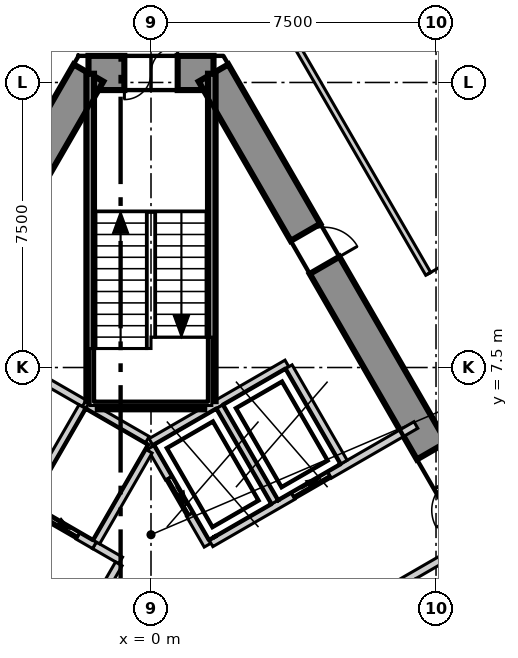
"""IFC4 building model, lengths in metres.
Left out: names, types, materials, properties, quantities, classifications, styles, units other than length and angle.
Written with IfcOpenShell. Run it as: python <this file> out.ifc"""

import sys

from ifc_helpers import new_model, si_unit, direction, frame, frame_2d, origin, place, context, subcontext, project, spatial, polyline, rectangle, outline, extrude, element, fill, save


model = new_model("IFC4")
c1 = context("Model", 3, precision=1e-05, world=origin(), true_north=direction((0.0, 1.0)))
c2 = subcontext(c1, "Body", "Model", "MODEL_VIEW")
j1 = project(units=[si_unit("LENGTHUNIT", "METRE"), si_unit("PLANEANGLEUNIT", "RADIAN")], contexts=[c1])
p1 = place(None, origin())
s1 = spatial("IfcSite", under=j1, at=p1, CompositionType="ELEMENT")
p2 = place(p1, origin())
s2 = spatial("IfcBuilding", under=s1, at=p2, CompositionType="ELEMENT")
p3 = place(p2, frame((0.0, 0.0, 83.3)))
s3 = spatial("IfcBuildingStorey", under=s2, at=p3, CompositionType="ELEMENT", Elevation=83.3)
p4 = place(p3, frame((1.645, 15.25, -0.3), z_axis=(0.0, 0.0, 1.0), x_axis=(-1.0, 0.0, 0.0)))
e1 = element("IfcWall", 1, at=p4, inside=s3, PredefinedType="SHEAR", context=c2, shape_type="SweptSolid", body=[
    extrude(outline(polyline([(-0.26, -0.45), (1.645, -0.45), (3.55, -0.45), (3.031, 0.45), (1.645, 0.45), (0.259, 0.45), (-0.26, -0.45)])), origin(), (0.0, 0.0, 1.0), 4.0),
])
p5 = place(p4, frame((0.945, 0.0, 0.3)))
e2 = element("IfcOpeningElement", 2, at=p5, cuts=e1, PredefinedType="OPENING", context=c2, shape_type="SweptSolid", body=[
    extrude(rectangle(XDim=1.4, YDim=2.1, at=frame_2d((0.7, 1.05))), frame((0.0, 0.46, 0.0), z_axis=(0.0, -1.0, 0.0), x_axis=(1.0, 0.0, 0.0)), (0.0, 0.0, 1.0), 0.92),
])
p6 = place(p3, frame((-1.645, 15.25, -0.3), z_axis=(0.0, 0.0, 1.0), x_axis=(-0.500026485275, -0.866010111964, 0.0)))
e3 = element("IfcWall", 3, at=p6, inside=s3, PredefinedType="SHEAR", context=c2, shape_type="SweptSolid", body=[
    extrude(outline(polyline([(-0.26, -0.45), (1.685, -0.45), (3.63, -0.45), (5.576, -0.45), (7.521, -0.45), (9.466, -0.449), (11.411, -0.449), (13.357, -0.449), (15.302, -0.449), (17.247, -0.449), (19.192, -0.449), (21.138, -0.449), (23.083, -0.449), (25.028, -0.449), (24.509, 0.45), (22.644, 0.45), (20.778, 0.45), (18.913, 0.45), (17.048, 0.45), (15.182, 0.449), (13.317, 0.449), (11.452, 0.449), (9.587, 0.449), (7.721, 0.449), (5.856, 0.449), (3.991, 0.449), (2.125, 0.449), (0.26, 0.449), (-0.26, -0.45)])), origin(), (0.0, 0.0, 1.0), 4.0),
])
p7 = place(p6, frame((11.834, 0.0, 0.3)))
e4 = element("IfcOpeningElement", 4, at=p7, cuts=e3, PredefinedType="OPENING", context=c2, shape_type="SweptSolid", body=[
    extrude(rectangle(XDim=1.1, YDim=2.1, at=frame_2d((0.55, 1.05))), frame((0.0, 0.46, 0.0), z_axis=(0.0, -1.0, 0.0), x_axis=(1.0, 0.0, 0.0)), (0.0, 0.0, 1.0), 0.92),
])
p8 = place(p6, frame((18.976, 0.0, 0.3)))
e5 = element("IfcOpeningElement", 5, at=p8, cuts=e3, PredefinedType="OPENING", context=c2, shape_type="SweptSolid", body=[
    extrude(rectangle(XDim=0.9, YDim=2.1, at=frame_2d((0.45, 1.05))), frame((0.0, 0.46, 0.0), z_axis=(0.0, -1.0, 0.0), x_axis=(1.0, 0.0, 0.0)), (0.0, 0.0, 1.0), 0.92),
])
p9 = place(p3, frame((14.03, -6.2, -0.3), z_axis=(0.0, 0.0, 1.0), x_axis=(-0.500026485275, 0.866010111964, 0.0)))
e6 = element("IfcWall", 6, at=p9, inside=s3, PredefinedType="SHEAR", context=c2, shape_type="SweptSolid", body=[
    extrude(outline(polyline([(-0.26, -0.449), (1.685, -0.449), (3.63, -0.449), (5.576, -0.449), (7.521, -0.449), (9.466, -0.449), (11.411, -0.449), (13.357, -0.449), (15.302, -0.449), (17.247, -0.45), (19.192, -0.45), (21.138, -0.45), (23.083, -0.45), (25.028, -0.45), (24.509, 0.449), (22.644, 0.449), (20.778, 0.449), (18.913, 0.449), (17.048, 0.449), (15.182, 0.449), (13.317, 0.449), (11.452, 0.449), (9.587, 0.449), (7.721, 0.45), (5.856, 0.45), (3.991, 0.45), (2.125, 0.45), (0.26, 0.45), (-0.26, -0.449)])), origin(), (0.0, 0.0, 1.0), 4.0),
])
p10 = place(p9, frame((11.484, 0.0, 0.3)))
e7 = element("IfcOpeningElement", 7, at=p10, cuts=e6, PredefinedType="OPENING", context=c2, shape_type="SweptSolid", body=[
    extrude(rectangle(XDim=1.8, YDim=2.1, at=frame_2d((0.9, 1.05))), frame((0.0, 0.46, 0.0), z_axis=(0.0, -1.0, 0.0), x_axis=(1.0, 0.0, 0.0)), (0.0, 0.0, 1.0), 0.92),
])
p11 = place(p9, frame((18.926, 0.0, 0.3)))
e8 = element("IfcOpeningElement", 8, at=p11, cuts=e6, PredefinedType="OPENING", context=c2, shape_type="SweptSolid", body=[
    extrude(rectangle(XDim=1.0, YDim=2.1, at=frame_2d((0.5, 1.05))), frame((0.0, 0.46, 0.0), z_axis=(0.0, -1.0, 0.0), x_axis=(1.0, 0.0, 0.0)), (0.0, 0.0, 1.0), 0.92),
])
p12 = place(p3, frame((33.317, -15.448, 0.0), z_axis=(0.0, 0.0, 1.0), x_axis=(-0.499999874703, 0.866025476125, 0.0)))
e9 = element("IfcWall", 9, at=p12, inside=s3, PredefinedType="ELEMENTEDWALL", context=c2, shape_type="SweptSolid", body=[
    extrude(rectangle(XDim=60.054, YDim=0.2, at=frame_2d((30.027, 0.0))), origin(), (0.0, 0.0, 1.0), 3.7),
])
p13 = place(p12, frame((2.094, 0.0, 0.9)))
e10 = element("IfcOpeningElement", 10, at=p13, cuts=e9, PredefinedType="OPENING", context=c2, shape_type="SweptSolid", body=[
    extrude(rectangle(XDim=5.6, YDim=2.5, at=frame_2d((2.8, 1.25))), frame((0.0, 0.11, 0.0), z_axis=(0.0, -1.0, 0.0), x_axis=(1.0, 0.0, 0.0)), (0.0, 0.0, 1.0), 0.22),
])
p14 = place(p12, frame((9.278, 0.0, 0.9)))
e11 = element("IfcOpeningElement", 11, at=p14, cuts=e9, PredefinedType="OPENING", context=c2, shape_type="SweptSolid", body=[
    extrude(rectangle(XDim=5.6, YDim=2.5, at=frame_2d((2.8, 1.25))), frame((0.0, 0.11, 0.0), z_axis=(0.0, -1.0, 0.0), x_axis=(1.0, 0.0, 0.0)), (0.0, 0.0, 1.0), 0.22),
])
p15 = place(p12, frame((16.462, 0.0, 0.9)))
e12 = element("IfcOpeningElement", 12, at=p15, cuts=e9, PredefinedType="OPENING", context=c2, shape_type="SweptSolid", body=[
    extrude(rectangle(XDim=5.6, YDim=2.5, at=frame_2d((2.8, 1.25))), frame((0.0, 0.11, 0.0), z_axis=(0.0, -1.0, 0.0), x_axis=(1.0, 0.0, 0.0)), (0.0, 0.0, 1.0), 0.22),
])
p16 = place(p12, frame((23.645, 0.0, 0.9)))
e13 = element("IfcOpeningElement", 13, at=p16, cuts=e9, PredefinedType="OPENING", context=c2, shape_type="SweptSolid", body=[
    extrude(rectangle(XDim=5.6, YDim=2.5, at=frame_2d((2.8, 1.25))), frame((0.0, 0.11, 0.0), z_axis=(0.0, -1.0, 0.0), x_axis=(1.0, 0.0, 0.0)), (0.0, 0.0, 1.0), 0.22),
])
p17 = place(p12, frame((30.829, 0.0, 0.9)))
e14 = element("IfcOpeningElement", 14, at=p17, cuts=e9, PredefinedType="OPENING", context=c2, shape_type="SweptSolid", body=[
    extrude(rectangle(XDim=5.6, YDim=2.5, at=frame_2d((2.8, 1.25))), frame((0.0, 0.11, 0.0), z_axis=(0.0, -1.0, 0.0), x_axis=(1.0, 0.0, 0.0)), (0.0, 0.0, 1.0), 0.22),
])
p18 = place(p12, frame((38.012, 0.0, 0.9)))
e15 = element("IfcOpeningElement", 15, at=p18, cuts=e9, PredefinedType="OPENING", context=c2, shape_type="SweptSolid", body=[
    extrude(rectangle(XDim=5.6, YDim=2.5, at=frame_2d((2.8, 1.25))), frame((0.0, 0.11, 0.0), z_axis=(0.0, -1.0, 0.0), x_axis=(1.0, 0.0, 0.0)), (0.0, 0.0, 1.0), 0.22),
])
p19 = place(p12, frame((45.196, 0.0, 0.9)))
e16 = element("IfcOpeningElement", 16, at=p19, cuts=e9, PredefinedType="OPENING", context=c2, shape_type="SweptSolid", body=[
    extrude(rectangle(XDim=5.6, YDim=2.5, at=frame_2d((2.8, 1.25))), frame((0.0, 0.11, 0.0), z_axis=(0.0, -1.0, 0.0), x_axis=(1.0, 0.0, 0.0)), (0.0, 0.0, 1.0), 0.22),
])
p20 = place(p12, frame((52.379, 0.0, 0.9)))
e17 = element("IfcOpeningElement", 17, at=p20, cuts=e9, PredefinedType="OPENING", context=c2, shape_type="SweptSolid", body=[
    extrude(rectangle(XDim=5.6, YDim=2.5, at=frame_2d((2.8, 1.25))), frame((0.0, 0.11, 0.0), z_axis=(0.0, -1.0, 0.0), x_axis=(1.0, 0.0, 0.0)), (0.0, 0.0, 1.0), 0.22),
])
p21 = place(p3, frame((-19.497, -11.17, 0.0), z_axis=(0.0, 0.0, 1.0), x_axis=(0.499998854553, 0.866026065108, 0.0)))
e18 = element("IfcWall", 18, at=p21, inside=s3, PredefinedType="PARTITIONING", context=c2, shape_type="SweptSolid", body=[
    extrude(rectangle(XDim=38.994, YDim=0.15, at=frame_2d((19.497, 0.0))), origin(), (0.0, 0.0, 1.0), 3.7),
])
p22 = place(p21, frame((35.844, 0.0, 0.0)))
e19 = element("IfcOpeningElement", 19, at=p22, cuts=e18, PredefinedType="OPENING", context=c2, shape_type="SweptSolid", body=[
    extrude(rectangle(XDim=1.1, YDim=2.1, at=frame_2d((0.55, 1.05))), frame((0.0, 0.085, 0.0), z_axis=(0.0, -1.0, 0.0), x_axis=(1.0, 0.0, 0.0)), (0.0, 0.0, 1.0), 0.17),
])
p23 = place(p21, frame((26.04, 0.0, 0.0)))
e20 = element("IfcOpeningElement", 20, at=p23, cuts=e18, PredefinedType="OPENING", context=c2, shape_type="SweptSolid", body=[
    extrude(rectangle(XDim=1.1, YDim=2.1, at=frame_2d((0.55, 1.05))), frame((0.0, 0.085, 0.0), z_axis=(0.0, -1.0, 0.0), x_axis=(1.0, 0.0, 0.0)), (0.0, 0.0, 1.0), 0.17),
])
p24 = place(p21, frame((7.272, 0.0, 0.0)))
e21 = element("IfcOpeningElement", 21, at=p24, cuts=e18, PredefinedType="OPENING", context=c2, shape_type="SweptSolid", body=[
    extrude(rectangle(XDim=1.1, YDim=2.1, at=frame_2d((0.55, 1.05))), frame((0.0, 0.085, 0.0), z_axis=(0.0, -1.0, 0.0), x_axis=(1.0, 0.0, 0.0)), (0.0, 0.0, 1.0), 0.17),
])
p25 = place(p21, frame((17.372, 0.0, 0.0)))
e22 = element("IfcOpeningElement", 22, at=p25, cuts=e18, PredefinedType="OPENING", context=c2, shape_type="SweptSolid", body=[
    extrude(rectangle(XDim=0.9, YDim=2.1, at=frame_2d((0.45, 1.05))), frame((0.0, 0.085, 0.0), z_axis=(0.0, -1.0, 0.0), x_axis=(1.0, 0.0, 0.0)), (0.0, 0.0, 1.0), 0.17),
])
p26 = place(p21, frame((14.172, 0.0, 0.0)))
e23 = element("IfcOpeningElement", 23, at=p26, cuts=e18, PredefinedType="OPENING", context=c2, shape_type="SweptSolid", body=[
    extrude(rectangle(XDim=0.9, YDim=2.1, at=frame_2d((0.45, 1.05))), frame((0.0, 0.085, 0.0), z_axis=(0.0, -1.0, 0.0), x_axis=(1.0, 0.0, 0.0)), (0.0, 0.0, 1.0), 0.17),
])
p27 = place(p21, frame((11.272, 0.0, 0.0)))
e24 = element("IfcOpeningElement", 24, at=p27, cuts=e18, PredefinedType="OPENING", context=c2, shape_type="SweptSolid", body=[
    extrude(rectangle(XDim=1.0, YDim=2.1, at=frame_2d((0.5, 1.05))), frame((0.0, 0.085, 0.0), z_axis=(0.0, -1.0, 0.0), x_axis=(1.0, 0.0, 0.0)), (0.0, 0.0, 1.0), 0.17),
])
p28 = place(p21, frame((1.904, 0.0, 0.0)))
e25 = element("IfcOpeningElement", 25, at=p28, cuts=e18, PredefinedType="OPENING", context=c2, shape_type="SweptSolid", body=[
    extrude(rectangle(XDim=1.1, YDim=2.1, at=frame_2d((0.55, 1.05))), frame((0.0, 0.085, 0.0), z_axis=(0.0, -1.0, 0.0), x_axis=(1.0, 0.0, 0.0)), (0.0, 0.0, 1.0), 0.17),
])
p29 = place(p3, frame((0.075, 22.47, 0.0), z_axis=(0.0, 0.0, 1.0), x_axis=(0.500002280369, -0.866024087209, 0.0)))
e26 = element("IfcWall", 26, at=p29, inside=s3, PredefinedType="PARTITIONING", context=c2, shape_type="SweptSolid", body=[
    extrude(rectangle(XDim=38.844, YDim=0.15, at=frame_2d((19.422, 0.0))), origin(), (0.0, 0.0, 1.0), 3.7),
])
p30 = place(p29, frame((35.844, 0.0, 0.0)))
e27 = element("IfcOpeningElement", 27, at=p30, cuts=e26, PredefinedType="OPENING", context=c2, shape_type="SweptSolid", body=[
    extrude(rectangle(XDim=1.1, YDim=2.1, at=frame_2d((0.55, 1.05))), frame((0.0, 0.085, 0.0), z_axis=(0.0, -1.0, 0.0), x_axis=(1.0, 0.0, 0.0)), (0.0, 0.0, 1.0), 0.17),
])
p31 = place(p29, frame((14.44, 0.0, 0.0)))
e28 = element("IfcOpeningElement", 28, at=p31, cuts=e26, PredefinedType="OPENING", context=c2, shape_type="SweptSolid", body=[
    extrude(rectangle(XDim=1.1, YDim=2.1, at=frame_2d((0.55, 1.05))), frame((0.0, 0.085, 0.0), z_axis=(0.0, -1.0, 0.0), x_axis=(1.0, 0.0, 0.0)), (0.0, 0.0, 1.0), 0.17),
])
p32 = place(p29, frame((31.74, 0.0, 0.0)))
e29 = element("IfcOpeningElement", 29, at=p32, cuts=e26, PredefinedType="OPENING", context=c2, shape_type="SweptSolid", body=[
    extrude(rectangle(XDim=0.9, YDim=2.1, at=frame_2d((0.45, 1.05))), frame((0.0, 0.085, 0.0), z_axis=(0.0, -1.0, 0.0), x_axis=(1.0, 0.0, 0.0)), (0.0, 0.0, 1.0), 0.17),
])
p33 = place(p29, frame((28.54, 0.0, 0.0)))
e30 = element("IfcOpeningElement", 30, at=p33, cuts=e26, PredefinedType="OPENING", context=c2, shape_type="SweptSolid", body=[
    extrude(rectangle(XDim=0.9, YDim=2.1, at=frame_2d((0.45, 1.05))), frame((0.0, 0.085, 0.0), z_axis=(0.0, -1.0, 0.0), x_axis=(1.0, 0.0, 0.0)), (0.0, 0.0, 1.0), 0.17),
])
p34 = place(p29, frame((25.74, 0.0, 0.0)))
e31 = element("IfcOpeningElement", 31, at=p34, cuts=e26, PredefinedType="OPENING", context=c2, shape_type="SweptSolid", body=[
    extrude(rectangle(XDim=1.0, YDim=2.1, at=frame_2d((0.5, 1.05))), frame((0.0, 0.085, 0.0), z_axis=(0.0, -1.0, 0.0), x_axis=(1.0, 0.0, 0.0)), (0.0, 0.0, 1.0), 0.17),
])
p35 = place(p29, frame((1.905, 0.0, 0.0)))
e32 = element("IfcOpeningElement", 32, at=p35, cuts=e26, PredefinedType="OPENING", context=c2, shape_type="SweptSolid", body=[
    extrude(rectangle(XDim=1.1, YDim=2.1, at=frame_2d((0.55, 1.05))), frame((0.0, 0.085, 0.0), z_axis=(0.0, -1.0, 0.0), x_axis=(1.0, 0.0, 0.0)), (0.0, 0.0, 1.0), 0.17),
])
p36 = place(p3, frame((-0.002, 5.541, 0.0), z_axis=(0.0, 0.0, 1.0), x_axis=(0.86600155993, 0.500041296494, 0.0)))
e33 = element("IfcWall", 33, at=p36, inside=s3, PredefinedType="SOLIDWALL", context=c2, shape_type="SweptSolid", body=[
    extrude(rectangle(XDim=4.132, YDim=0.2, at=frame_2d((2.066, 0.0))), origin(), (0.0, 0.0, 1.0), 3.7),
])
p37 = place(p3, frame((0.0, 5.4, 0.0), z_axis=(0.0, 0.0, 1.0), x_axis=(0.500103862429, -0.865965430478, 0.0)))
e34 = element("IfcWall", 34, at=p37, inside=s3, PredefinedType="SOLIDWALL", context=c2, shape_type="SweptSolid", body=[
    extrude(rectangle(XDim=2.973, YDim=0.2, at=frame_2d((1.487, 0.0))), origin(), (0.0, 0.0, 1.0), 3.7),
])
p38 = place(p37, frame((0.937, 0.0, 0.0)))
e35 = element("IfcOpeningElement", 35, at=p38, cuts=e34, PredefinedType="OPENING", context=c2, shape_type="SweptSolid", body=[
    extrude(rectangle(XDim=1.1, YDim=2.1, at=frame_2d((0.55, 1.05))), frame((0.0, 0.11, 0.0), z_axis=(0.0, -1.0, 0.0), x_axis=(1.0, 0.0, 0.0)), (0.0, 0.0, 1.0), 0.22),
])
p39 = place(p3, frame((1.578, 2.874, 0.0), z_axis=(0.0, 0.0, 1.0), x_axis=(0.866031483044, 0.499989470266, 0.0)))
e36 = element("IfcWall", 36, at=p39, inside=s3, PredefinedType="SOLIDWALL", context=c2, shape_type="SweptSolid", body=[
    extrude(rectangle(XDim=6.226, YDim=0.2, at=frame_2d((3.113, 0.0))), origin(), (0.0, 0.0, 1.0), 3.7),
])
p40 = place(p39, frame((2.496, 0.0, 0.0)))
e37 = element("IfcOpeningElement", 37, at=p40, cuts=e36, PredefinedType="OPENING", context=c2, shape_type="SweptSolid", body=[
    extrude(rectangle(XDim=1.1, YDim=2.1, at=frame_2d((0.55, 1.05))), frame((0.0, 0.11, 0.0), z_axis=(0.0, -1.0, 0.0), x_axis=(1.0, 0.0, 0.0)), (0.0, 0.0, 1.0), 0.22),
])
p41 = place(p3, frame((3.278, -0.071, 0.0), z_axis=(0.0, 0.0, 1.0), x_axis=(0.865953757655, 0.500124074208, 0.0)))
e38 = element("IfcWall", 38, at=p41, inside=s3, PredefinedType="SOLIDWALL", context=c2, shape_type="SweptSolid", body=[
    extrude(rectangle(XDim=6.227, YDim=0.2, at=frame_2d((3.113, 0.0))), origin(), (0.0, 0.0, 1.0), 3.7),
])
for number, where, z_axis, x_axis in (
    (39, (3.626, 7.52, 0.0), (0.0, 0.0, 1.0), (0.5, -0.866, 0.0)),
    (40, (1.807, 6.47, 0.0), (0.0, 0.0, 1.0), (0.5, -0.866, 0.0)),
):
    element("IfcWall", number, at=place(p3, frame(where, z_axis=z_axis, x_axis=x_axis)), inside=s3, PredefinedType="SOLIDWALL", context=c2, shape_type="SweptSolid", body=[
        extrude(rectangle(XDim=2.9, YDim=0.2, at=frame_2d((1.45, 0.0))), origin(), (0.0, 0.0, 1.0), 3.7),
    ])
p42 = place(p3, frame((-1.488, 2.822, 0.0), z_axis=(0.0, 0.0, 1.0), x_axis=(0.866236612152, -0.499633997809, 0.0)))
e41 = element("IfcWall", 41, at=p42, inside=s3, PredefinedType="SOLIDWALL", context=c2, shape_type="SweptSolid", body=[
    extrude(rectangle(XDim=0.796, YDim=0.2, at=frame_2d((0.398, 0.0))), origin(), (0.0, 0.0, 1.0), 3.7),
])
p43 = place(p3, frame((-3.489, 7.557, 0.0), z_axis=(0.0, 0.0, 1.0), x_axis=(0.866010750942, -0.50002537861, 0.0)))
e42 = element("IfcWall", 42, at=p43, inside=s3, PredefinedType="SOLIDWALL", context=c2, shape_type="SweptSolid", body=[
    extrude(rectangle(XDim=2.0, YDim=0.2, at=frame_2d((1.0, 0.0))), origin(), (0.0, 0.0, 1.0), 3.7),
])
p44 = place(p3, frame((-2.444, -0.433, 0.0), z_axis=(0.0, 0.0, 1.0), x_axis=(0.500035624827, 0.866004834804, 0.0)))
e43 = element("IfcWall", 43, at=p44, inside=s3, PredefinedType="SOLIDWALL", context=c2, shape_type="SweptSolid", body=[
    extrude(rectangle(XDim=3.194, YDim=0.2, at=frame_2d((1.597, 0.0))), origin(), (0.0, 0.0, 1.0), 3.7),
])
p45 = place(p3, frame((-3.309, 3.873, 0.0), z_axis=(0.0, 0.0, 1.0), x_axis=(0.866098583652, -0.499873227325, 0.0)))
e44 = element("IfcWall", 44, at=p45, inside=s3, PredefinedType="SOLIDWALL", context=c2, shape_type="SweptSolid", body=[
    extrude(rectangle(XDim=2.103, YDim=0.2, at=frame_2d((1.051, 0.0))), origin(), (0.0, 0.0, 1.0), 3.7),
])
p46 = place(p45, frame((0.502, 0.0, 0.0)))
e45 = element("IfcOpeningElement", 45, at=p46, cuts=e44, PredefinedType="OPENING", context=c2, shape_type="SweptSolid", body=[
    extrude(rectangle(XDim=1.1, YDim=2.1, at=frame_2d((0.55, 1.05))), frame((0.0, 0.11, 0.0), z_axis=(0.0, -1.0, 0.0), x_axis=(1.0, 0.0, 0.0)), (0.0, 0.0, 1.0), 0.22),
])
p47 = place(p3, frame((-3.257, 3.959, 0.0), z_axis=(0.0, 0.0, 1.0), x_axis=(0.50012328804, 0.865954211699, 0.0)))
e46 = element("IfcWall", 46, at=p47, inside=s3, PredefinedType="SOLIDWALL", context=c2, shape_type="SweptSolid", body=[
    extrude(rectangle(XDim=2.9, YDim=0.2, at=frame_2d((1.45, 0.0))), origin(), (0.0, 0.0, 1.0), 3.7),
])
p48 = place(p3, frame((-1.67, 6.507, 0.0), z_axis=(0.0, 0.0, 1.0), x_axis=(0.865941441609, -0.500145398563, 0.0)))
e47 = element("IfcWall", 47, at=p48, inside=s3, PredefinedType="SOLIDWALL", context=c2, shape_type="SweptSolid", body=[
    extrude(rectangle(XDim=1.815, YDim=0.2, at=frame_2d((0.908, 0.0))), origin(), (0.0, 0.0, 1.0), 3.7),
])
p49 = place(p3, frame((-1.438, 2.909, 0.0), z_axis=(0.0, 0.0, 1.0), x_axis=(0.499829630636, 0.866123744241, 0.0)))
e48 = element("IfcWall", 48, at=p49, inside=s3, PredefinedType="SOLIDWALL", context=c2, shape_type="SweptSolid", body=[
    extrude(rectangle(XDim=2.761, YDim=0.2, at=frame_2d((1.38, 0.0))), origin(), (0.0, 0.0, 1.0), 3.7),
])
p50 = place(p3, frame((1.6, 6.615, 0.0), z_axis=(0.0, 0.0, 1.0), x_axis=(0.0, 1.0, 0.0)))
e49 = element("IfcWall", 49, at=p50, inside=s3, PredefinedType="SOLIDWALL", context=c2, shape_type="SweptSolid", body=[
    extrude(rectangle(XDim=8.615, YDim=0.2, at=frame_2d((4.308, 0.0))), origin(), (0.0, 0.0, 1.0), 3.7),
])
p51 = place(p3, frame((-1.4, 6.5, 0.0), z_axis=(0.0, 0.0, 1.0), x_axis=(1.0, 0.0, 0.0)))
e50 = element("IfcWall", 50, at=p51, inside=s3, PredefinedType="SOLIDWALL", context=c2, shape_type="SweptSolid", body=[
    extrude(rectangle(XDim=2.8, YDim=0.2, at=frame_2d((1.4, 0.0))), origin(), (0.0, 0.0, 1.0), 3.7),
])
p52 = place(p3, frame((-1.6, 6.615, 0.0), z_axis=(0.0, 0.0, 1.0), x_axis=(0.0, 1.0, 0.0)))
e51 = element("IfcWall", 51, at=p52, inside=s3, PredefinedType="SOLIDWALL", context=c2, shape_type="SweptSolid", body=[
    extrude(rectangle(XDim=8.615, YDim=0.2, at=frame_2d((4.308, 0.0))), origin(), (0.0, 0.0, 1.0), 3.7),
])
p53 = place(p38, origin())
e52 = element("IfcDoor", 52, at=p53, inside=s3, OperationType="SLIDING_TO_LEFT", PredefinedType="DOOR", context=c2, shape_type="SweptSolid", body=[
    extrude(rectangle(XDim=1.1, YDim=2.1, at=frame_2d((0.55, 1.05))), frame((0.0, 0.025, 0.0), z_axis=(0.0, -1.0, 0.0), x_axis=(1.0, 0.0, 0.0)), (0.0, 0.0, 1.0), 0.05),
])
fill(e35, e52)
p54 = place(p40, origin())
e53 = element("IfcDoor", 53, at=p54, inside=s3, OperationType="SLIDING_TO_LEFT", PredefinedType="DOOR", context=c2, shape_type="SweptSolid", body=[
    extrude(rectangle(XDim=1.1, YDim=2.1, at=frame_2d((0.55, 1.05))), frame((0.0, 0.025, 0.0), z_axis=(0.0, -1.0, 0.0), x_axis=(1.0, 0.0, 0.0)), (0.0, 0.0, 1.0), 0.05),
])
fill(e37, e53)
p55 = place(p46, origin())
e54 = element("IfcDoor", 54, at=p55, inside=s3, OperationType="SLIDING_TO_LEFT", PredefinedType="DOOR", context=c2, shape_type="SweptSolid", body=[
    extrude(rectangle(XDim=1.1, YDim=2.1, at=frame_2d((0.55, 1.05))), frame((0.0, 0.025, 0.0), z_axis=(0.0, -1.0, 0.0), x_axis=(1.0, 0.0, 0.0)), (0.0, 0.0, 1.0), 0.05),
])
fill(e45, e54)
p56 = place(p31, origin())
e55 = element("IfcDoor", 55, at=p56, inside=s3, OperationType="SINGLE_SWING_RIGHT", PredefinedType="DOOR", context=c2, shape_type="SweptSolid", body=[
    extrude(rectangle(XDim=1.1, YDim=2.1, at=frame_2d((0.55, 1.05))), frame((0.0, 0.025, 0.0), z_axis=(0.0, -1.0, 0.0), x_axis=(1.0, 0.0, 0.0)), (0.0, 0.0, 1.0), 0.05),
])
fill(e28, e55)
p57 = place(p10, origin())
e56 = element("IfcDoor", 56, at=p57, inside=s3, OperationType="DOUBLE_DOOR_SINGLE_SWING", PredefinedType="DOOR", context=c2, shape_type="SweptSolid", body=[
    extrude(rectangle(XDim=1.8, YDim=2.1, at=frame_2d((0.9, 1.05))), frame((0.0, 0.025, 0.0), z_axis=(0.0, -1.0, 0.0), x_axis=(1.0, 0.0, 0.0)), (0.0, 0.0, 1.0), 0.05),
])
fill(e7, e56)
p58 = place(p5, origin())
e57 = element("IfcDoor", 57, at=p58, inside=s3, OperationType="DOUBLE_DOOR_SINGLE_SWING", PredefinedType="DOOR", context=c2, shape_type="SweptSolid", body=[
    extrude(rectangle(XDim=1.4, YDim=2.1, at=frame_2d((0.7, 1.05))), frame((0.0, 0.025, 0.0), z_axis=(0.0, -1.0, 0.0), x_axis=(1.0, 0.0, 0.0)), (0.0, 0.0, 1.0), 0.05),
])
fill(e2, e57)
p59 = place(p11, origin())
e58 = element("IfcDoor", 58, at=p59, inside=s3, OperationType="SINGLE_SWING_LEFT", PredefinedType="DOOR", context=c2, shape_type="SweptSolid", body=[
    extrude(rectangle(XDim=1.0, YDim=2.1, at=frame_2d((0.5, 1.05))), frame((0.0, 0.025, 0.0), z_axis=(0.0, -1.0, 0.0), x_axis=(1.0, 0.0, 0.0)), (0.0, 0.0, 1.0), 0.05),
])
fill(e8, e58)
save(model, sys.argv[1])
